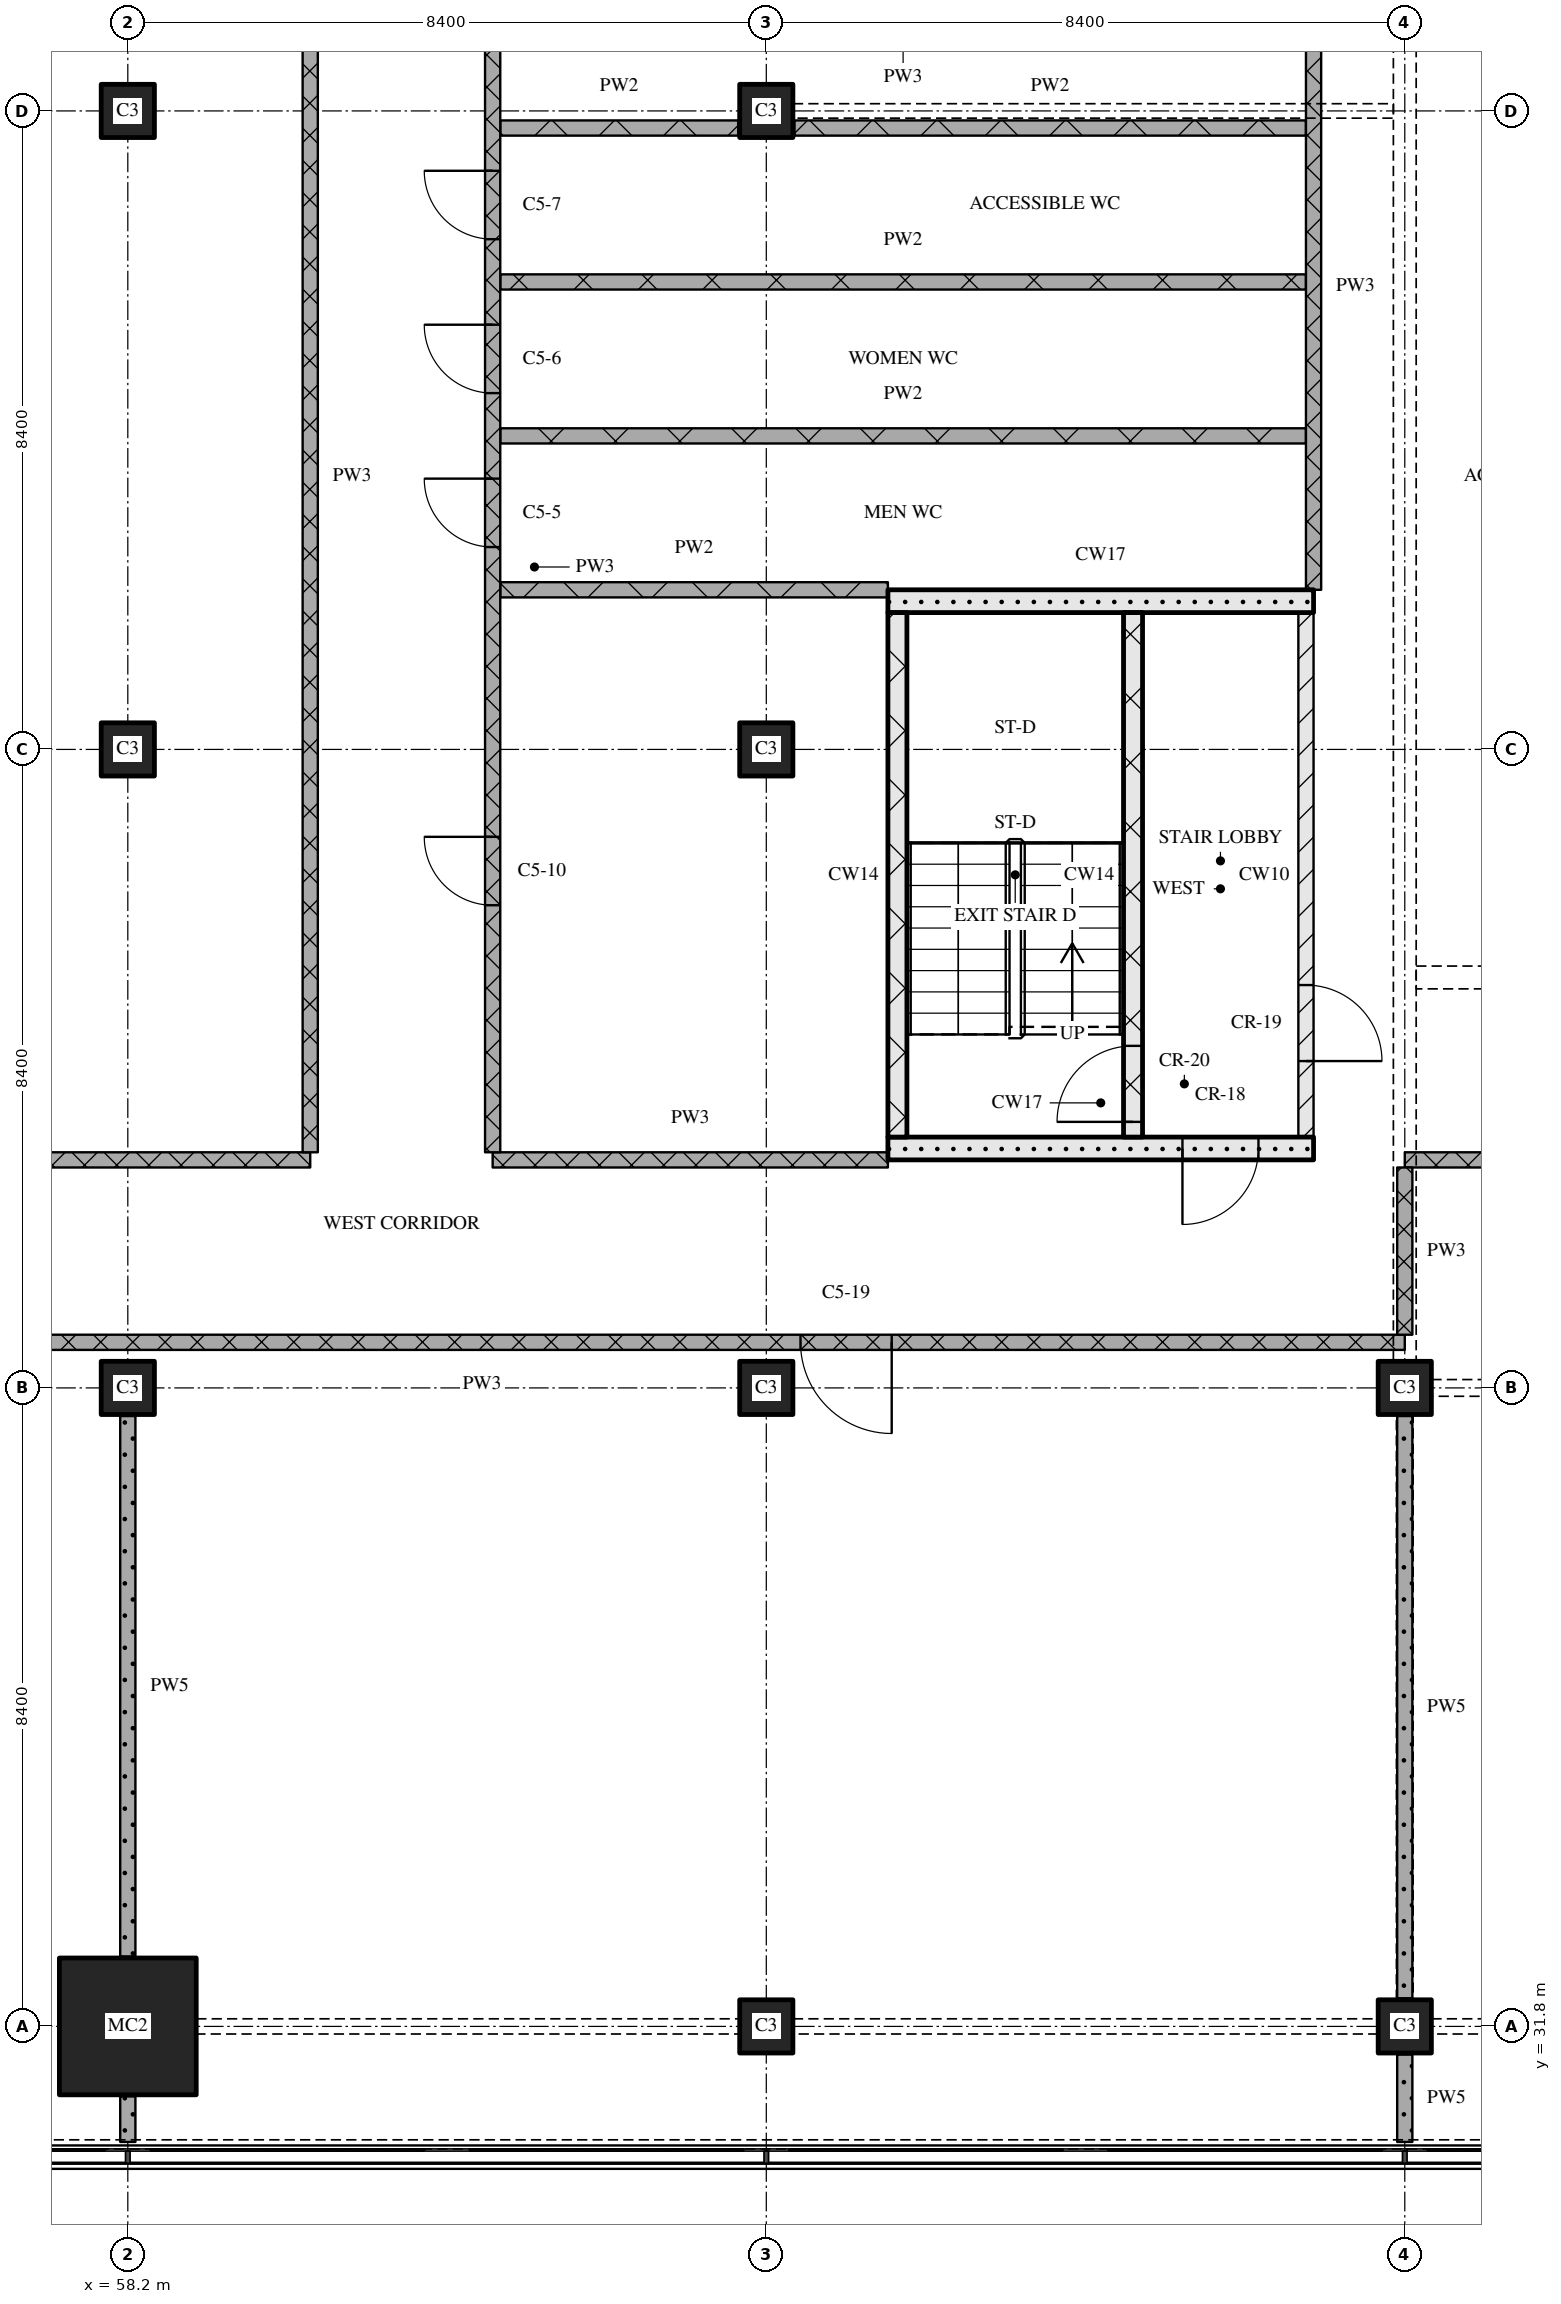
"""IFC4 building model, lengths in metres.
Left out: names, types, materials, properties, quantities, classifications, styles, units other than length and angle.
Written with IfcOpenShell. Run it as: python <this file> out.ifc"""

import sys

from ifc_helpers import new_model, si_unit, direction, frame, frame_2d, origin, origin_2d, place, context, subcontext, project, spatial, rectangle, extrude, element, fill, save


model = new_model("IFC4")
c1 = context("Model", 3, precision=1e-05, world=origin(), true_north=direction((0.0, 1.0)))
c2 = subcontext(c1, "Body", "Model", "MODEL_VIEW")
j1 = project(units=[si_unit("LENGTHUNIT", "METRE"), si_unit("PLANEANGLEUNIT", "RADIAN")], contexts=[c1])
p1 = place(None, origin())
s1 = spatial("IfcSite", under=j1, at=p1, CompositionType="ELEMENT")
p2 = place(p1, origin())
s2 = spatial("IfcBuilding", under=s1, at=p2, CompositionType="ELEMENT")
p3 = place(p2, frame((0.0, 0.0, 190.65)))
s3 = spatial("IfcBuildingStorey", under=s2, at=p3, CompositionType="ELEMENT", Elevation=190.65)
p4 = place(p3, frame((58.2, 31.8, 0.0), z_axis=(0.0, 0.0, 1.0), x_axis=(1.0, 0.0, 0.0)))
e1 = element("IfcColumn", 1, at=p4, inside=s3, PredefinedType="COLUMN", context=c2, shape_type="SweptSolid", body=[
    extrude(rectangle(XDim=1.8, YDim=1.8, at=origin_2d()), origin(), (0.0, 0.0, 1.0), 3.6),
])
for number, where, z_axis, x_axis in (
    (2, (58.2, 40.2, 0.0), (0.0, 0.0, 1.0), (1.0, 0.0, 0.0)),
    (3, (58.2, 48.6, 0.0), (0.0, 0.0, 1.0), (1.0, 0.0, 0.0)),
    (4, (58.2, 57.0, 0.0), (0.0, 0.0, 1.0), (1.0, 0.0, 0.0)),
    (5, (66.6, 31.8, 0.0), (0.0, 0.0, 1.0), (1.0, 0.0, 0.0)),
    (6, (66.6, 40.2, 0.0), (0.0, 0.0, 1.0), (1.0, 0.0, 0.0)),
    (7, (66.6, 48.6, 0.0), (0.0, 0.0, 1.0), (1.0, 0.0, 0.0)),
    (8, (66.6, 57.0, 0.0), (0.0, 0.0, 1.0), (1.0, 0.0, 0.0)),
    (9, (75.0, 31.8, 0.0), (0.0, 0.0, 1.0), (1.0, 0.0, 0.0)),
    (10, (75.0, 40.2, 0.0), (0.0, 0.0, 1.0), (1.0, 0.0, 0.0)),
):
    element("IfcColumn", number, at=place(p3, frame(where, z_axis=z_axis, x_axis=x_axis)), inside=s3, PredefinedType="COLUMN", context=c2, shape_type="SweptSolid", body=[
        extrude(rectangle(XDim=0.7, YDim=0.7, at=origin_2d()), origin(), (0.0, 0.0, 1.0), 3.6),
    ])
p5 = place(p3, frame((68.2, 43.35, 0.0), z_axis=(0.0, 0.0, 1.0), x_axis=(1.0, 0.0, 0.0)))
e11 = element("IfcWall", 11, at=p5, inside=s3, PredefinedType="SOLIDWALL", context=c2, shape_type="SweptSolid", body=[
    extrude(rectangle(XDim=5.6, YDim=0.3, at=frame_2d((2.8, 0.0))), origin(), (0.0, 0.0, 1.0), 3.3),
])
p6 = place(p5, frame((3.875, 0.0, 0.0)))
e12 = element("IfcOpeningElement", 12, at=p6, cuts=e11, PredefinedType="OPENING", context=c2, shape_type="SweptSolid", body=[
    extrude(rectangle(XDim=1.0, YDim=2.1, at=frame_2d((0.5, 1.05))), frame((0.0, 0.16, 0.0), z_axis=(0.0, -1.0, 0.0), x_axis=(1.0, 0.0, 0.0)), (0.0, 0.0, 1.0), 0.32),
])
p7 = place(p3, frame((68.325, 43.5, 0.0), z_axis=(0.0, 0.0, 1.0), x_axis=(0.0, 1.0, 0.0)))
e13 = element("IfcWall", 13, at=p7, inside=s3, PredefinedType="SOLIDWALL", context=c2, shape_type="SweptSolid", body=[
    extrude(rectangle(XDim=6.9, YDim=0.25, at=frame_2d((3.45, 0.0))), origin(), (0.0, 0.0, 1.0), 3.3),
])
p8 = place(p3, frame((71.425, 43.5, 0.0), z_axis=(0.0, 0.0, 1.0), x_axis=(0.0, 1.0, 0.0)))
e14 = element("IfcWall", 14, at=p8, inside=s3, PredefinedType="SOLIDWALL", context=c2, shape_type="SweptSolid", body=[
    extrude(rectangle(XDim=6.9, YDim=0.25, at=frame_2d((3.45, 0.0))), origin(), (0.0, 0.0, 1.0), 3.3),
])
p9 = place(p8, frame((0.2, 0.0, 0.0)))
e15 = element("IfcOpeningElement", 15, at=p9, cuts=e14, PredefinedType="OPENING", context=c2, shape_type="SweptSolid", body=[
    extrude(rectangle(XDim=1.0, YDim=2.1, at=frame_2d((0.5, 1.05))), frame((0.0, 0.135, 0.0), z_axis=(0.0, -1.0, 0.0), x_axis=(1.0, 0.0, 0.0)), (0.0, 0.0, 1.0), 0.27),
])
p10 = place(p3, frame((73.7, 43.5, 0.0), z_axis=(0.0, 0.0, 1.0), x_axis=(0.0, 1.0, 0.0)))
e16 = element("IfcWall", 16, at=p10, inside=s3, PredefinedType="PARTITIONING", context=c2, shape_type="SweptSolid", body=[
    extrude(rectangle(XDim=6.9, YDim=0.2, at=frame_2d((3.45, 0.0))), origin(), (0.0, 0.0, 1.0), 3.3),
])
p11 = place(p10, frame((1.0, 0.0, 0.0)))
e17 = element("IfcOpeningElement", 17, at=p11, cuts=e16, PredefinedType="OPENING", context=c2, shape_type="SweptSolid", body=[
    extrude(rectangle(XDim=1.0, YDim=2.1, at=frame_2d((0.5, 1.05))), frame((0.0, 0.11, 0.0), z_axis=(0.0, -1.0, 0.0), x_axis=(1.0, 0.0, 0.0)), (0.0, 0.0, 1.0), 0.22),
])
p12 = place(p3, frame((68.2, 50.55, 0.0), z_axis=(0.0, 0.0, 1.0), x_axis=(1.0, 0.0, 0.0)))
e18 = element("IfcWall", 18, at=p12, inside=s3, PredefinedType="SOLIDWALL", context=c2, shape_type="SweptSolid", body=[
    extrude(rectangle(XDim=5.6, YDim=0.3, at=frame_2d((2.8, 0.0))), origin(), (0.0, 0.0, 1.0), 3.3),
])
p13 = place(p3, frame((75.0, 40.8, 0.0), z_axis=(0.0, 0.0, 1.0), x_axis=(-1.0, 0.0, 0.0)))
e19 = element("IfcWall", 19, at=p13, inside=s3, PredefinedType="PARTITIONING", context=c2, shape_type="SweptSolid", body=[
    extrude(rectangle(XDim=24.28, YDim=0.2, at=frame_2d((12.14, 0.0))), origin(), (0.0, 0.0, 1.0), 3.3),
])
p14 = place(p13, frame((6.75, 0.0, 0.0)))
e20 = element("IfcOpeningElement", 20, at=p14, cuts=e19, PredefinedType="OPENING", context=c2, shape_type="SweptSolid", body=[
    extrude(rectangle(XDim=1.2, YDim=2.1, at=frame_2d((0.6, 1.05))), frame((0.0, 0.11, 0.0), z_axis=(0.0, -1.0, 0.0), x_axis=(1.0, 0.0, 0.0)), (0.0, 0.0, 1.0), 0.22),
])
p15 = place(p13, frame((20.728, 0.0, 0.0)))
e21 = element("IfcOpeningElement", 21, at=p15, cuts=e19, PredefinedType="OPENING", context=c2, shape_type="SweptSolid", body=[
    extrude(rectangle(XDim=1.2, YDim=2.1, at=frame_2d((0.6, 1.05))), frame((0.0, 0.11, 0.0), z_axis=(0.0, -1.0, 0.0), x_axis=(1.0, 0.0, 0.0)), (0.0, 0.0, 1.0), 0.22),
])
p16 = place(p3, frame((48.28, 43.2, 0.0), z_axis=(0.0, 0.0, 1.0), x_axis=(1.0, 0.0, 0.0)))
e22 = element("IfcWall", 22, at=p16, inside=s3, PredefinedType="PARTITIONING", context=c2, shape_type="SweptSolid", body=[
    extrude(rectangle(XDim=12.32, YDim=0.2, at=frame_2d((6.16, 0.0))), origin(), (0.0, 0.0, 1.0), 3.3),
])
p17 = place(p16, frame((5.42, 0.0, 0.0)))
e23 = element("IfcOpeningElement", 23, at=p17, cuts=e22, PredefinedType="OPENING", context=c2, shape_type="SweptSolid", body=[
    extrude(rectangle(XDim=1.2, YDim=2.1, at=frame_2d((0.6, 1.05))), frame((0.0, 0.11, 0.0), z_axis=(0.0, -1.0, 0.0), x_axis=(1.0, 0.0, 0.0)), (0.0, 0.0, 1.0), 0.22),
])
p18 = place(p3, frame((63.0, 43.2, 0.0), z_axis=(0.0, 0.0, 1.0), x_axis=(1.0, 0.0, 0.0)))
e24 = element("IfcWall", 24, at=p18, inside=s3, PredefinedType="PARTITIONING", context=c2, shape_type="SweptSolid", body=[
    extrude(rectangle(XDim=5.2, YDim=0.2, at=frame_2d((2.6, 0.0))), origin(), (0.0, 0.0, 1.0), 3.3),
])
p19 = place(p3, frame((100.2, 43.2, 0.0), z_axis=(0.0, 0.0, 1.0), x_axis=(-1.0, 0.0, 0.0)))
e25 = element("IfcWall", 25, at=p19, inside=s3, PredefinedType="PARTITIONING", context=c2, shape_type="SweptSolid", body=[
    extrude(rectangle(XDim=25.2, YDim=0.2, at=frame_2d((12.6, 0.0))), origin(), (0.0, 0.0, 1.0), 3.3),
])
p20 = place(p19, frame((3.6, 0.0, 0.0)))
e26 = element("IfcOpeningElement", 26, at=p20, cuts=e25, PredefinedType="OPENING", context=c2, shape_type="SweptSolid", body=[
    extrude(rectangle(XDim=1.2, YDim=2.1, at=frame_2d((0.6, 1.05))), frame((0.0, 0.11, 0.0), z_axis=(0.0, -1.0, 0.0), x_axis=(1.0, 0.0, 0.0)), (0.0, 0.0, 1.0), 0.22),
])
p21 = place(p19, frame((16.2, 0.0, 0.0)))
e27 = element("IfcOpeningElement", 27, at=p21, cuts=e25, PredefinedType="OPENING", context=c2, shape_type="SweptSolid", body=[
    extrude(rectangle(XDim=1.2, YDim=2.1, at=frame_2d((0.6, 1.05))), frame((0.0, 0.11, 0.0), z_axis=(0.0, -1.0, 0.0), x_axis=(1.0, 0.0, 0.0)), (0.0, 0.0, 1.0), 0.22),
])
p22 = place(p3, frame((63.1, 50.7, 0.0), z_axis=(0.0, 0.0, 1.0), x_axis=(1.0, 0.0, 0.0)))
e28 = element("IfcWall", 28, at=p22, inside=s3, PredefinedType="PARTITIONING", context=c2, shape_type="SweptSolid", body=[
    extrude(rectangle(XDim=5.1, YDim=0.2, at=frame_2d((2.55, 0.0))), origin(), (0.0, 0.0, 1.0), 3.3),
])
for number, where, z_axis, x_axis in (
    (29, (63.1, 52.725, 0.0), (0.0, 0.0, 1.0), (1.0, 0.0, 0.0)),
    (30, (63.1, 54.75, 0.0), (0.0, 0.0, 1.0), (1.0, 0.0, 0.0)),
):
    element("IfcWall", number, at=place(p3, frame(where, z_axis=z_axis, x_axis=x_axis)), inside=s3, PredefinedType="PARTITIONING", context=c2, shape_type="SweptSolid", body=[
        extrude(rectangle(XDim=10.6, YDim=0.2, at=frame_2d((5.3, 0.0))), origin(), (0.0, 0.0, 1.0), 3.3),
    ])
p23 = place(p3, frame((63.1, 56.775, 0.0), z_axis=(0.0, 0.0, 1.0), x_axis=(1.0, 0.0, 0.0)))
e31 = element("IfcWall", 31, at=p23, inside=s3, PredefinedType="PARTITIONING", context=c2, shape_type="SweptSolid", body=[
    extrude(rectangle(XDim=3.13, YDim=0.2, at=frame_2d((1.565, 0.0))), origin(), (0.0, 0.0, 1.0), 3.3),
])
p24 = place(p3, frame((66.97, 56.775, 0.0), z_axis=(0.0, 0.0, 1.0), x_axis=(1.0, 0.0, 0.0)))
e32 = element("IfcWall", 32, at=p24, inside=s3, PredefinedType="PARTITIONING", context=c2, shape_type="SweptSolid", body=[
    extrude(rectangle(XDim=6.73, YDim=0.2, at=frame_2d((3.365, 0.0))), origin(), (0.0, 0.0, 1.0), 3.3),
])
p25 = place(p3, frame((58.2, 30.88, 0.0), z_axis=(0.0, 0.0, 1.0), x_axis=(0.0, -1.0, 0.0)))
e33 = element("IfcWall", 33, at=p25, inside=s3, PredefinedType="PARTITIONING", context=c2, shape_type="SweptSolid", body=[
    extrude(rectangle(XDim=0.6, YDim=0.2, at=frame_2d((0.3, 0.0))), origin(), (0.0, 0.0, 1.0), 3.3),
])
p26 = place(p3, frame((58.2, 39.83, 0.0), z_axis=(0.0, 0.0, 1.0), x_axis=(0.0, -1.0, 0.0)))
e34 = element("IfcWall", 34, at=p26, inside=s3, PredefinedType="PARTITIONING", context=c2, shape_type="SweptSolid", body=[
    extrude(rectangle(XDim=7.11, YDim=0.2, at=frame_2d((3.555, 0.0))), origin(), (0.0, 0.0, 1.0), 3.3),
])
p27 = place(p3, frame((60.6, 61.1, 0.0), z_axis=(0.0, 0.0, 1.0), x_axis=(0.0, -1.0, 0.0)))
e35 = element("IfcWall", 35, at=p27, inside=s3, PredefinedType="PARTITIONING", context=c2, shape_type="SweptSolid", body=[
    extrude(rectangle(XDim=17.8, YDim=0.2, at=frame_2d((8.9, 0.0))), origin(), (0.0, 0.0, 1.0), 3.3),
])
p28 = place(p3, frame((63.0, 58.7, 0.0), z_axis=(0.0, 0.0, 1.0), x_axis=(0.0, -1.0, 0.0)))
e36 = element("IfcWall", 36, at=p28, inside=s3, PredefinedType="PARTITIONING", context=c2, shape_type="SweptSolid", body=[
    extrude(rectangle(XDim=15.4, YDim=0.2, at=frame_2d((7.7, 0.0))), origin(), (0.0, 0.0, 1.0), 3.3),
])
p29 = place(p28, frame((2.488, 0.0, 0.0)))
e37 = element("IfcOpeningElement", 37, at=p29, cuts=e36, PredefinedType="OPENING", context=c2, shape_type="SweptSolid", body=[
    extrude(rectangle(XDim=0.9, YDim=2.1, at=frame_2d((0.45, 1.05))), frame((0.0, 0.11, 0.0), z_axis=(0.0, -1.0, 0.0), x_axis=(1.0, 0.0, 0.0)), (0.0, 0.0, 1.0), 0.22),
])
p30 = place(p28, frame((4.512, 0.0, 0.0)))
e38 = element("IfcOpeningElement", 38, at=p30, cuts=e36, PredefinedType="OPENING", context=c2, shape_type="SweptSolid", body=[
    extrude(rectangle(XDim=0.9, YDim=2.1, at=frame_2d((0.45, 1.05))), frame((0.0, 0.11, 0.0), z_axis=(0.0, -1.0, 0.0), x_axis=(1.0, 0.0, 0.0)), (0.0, 0.0, 1.0), 0.22),
])
p31 = place(p28, frame((6.538, 0.0, 0.0)))
e39 = element("IfcOpeningElement", 39, at=p31, cuts=e36, PredefinedType="OPENING", context=c2, shape_type="SweptSolid", body=[
    extrude(rectangle(XDim=0.9, YDim=2.1, at=frame_2d((0.45, 1.05))), frame((0.0, 0.11, 0.0), z_axis=(0.0, -1.0, 0.0), x_axis=(1.0, 0.0, 0.0)), (0.0, 0.0, 1.0), 0.22),
])
p32 = place(p28, frame((11.25, 0.0, 0.0)))
e40 = element("IfcOpeningElement", 40, at=p32, cuts=e36, PredefinedType="OPENING", context=c2, shape_type="SweptSolid", body=[
    extrude(rectangle(XDim=0.9, YDim=2.1, at=frame_2d((0.45, 1.05))), frame((0.0, 0.11, 0.0), z_axis=(0.0, -1.0, 0.0), x_axis=(1.0, 0.0, 0.0)), (0.0, 0.0, 1.0), 0.22),
])
p33 = place(p3, frame((73.8, 58.7, 0.0), z_axis=(0.0, 0.0, 1.0), x_axis=(0.0, -1.0, 0.0)))
e41 = element("IfcWall", 41, at=p33, inside=s3, PredefinedType="PARTITIONING", context=c2, shape_type="SweptSolid", body=[
    extrude(rectangle(XDim=8.0, YDim=0.2, at=frame_2d((4.0, 0.0))), origin(), (0.0, 0.0, 1.0), 3.3),
])
p34 = place(p3, frame((75.0, 43.1, 0.0), z_axis=(0.0, 0.0, 1.0), x_axis=(0.0, -1.0, 0.0)))
e42 = element("IfcWall", 42, at=p34, inside=s3, PredefinedType="PARTITIONING", context=c2, shape_type="SweptSolid", body=[
    extrude(rectangle(XDim=2.2, YDim=0.2, at=frame_2d((1.1, 0.0))), origin(), (0.0, 0.0, 1.0), 2.41),
])
p35 = place(p3, frame((75.0, 31.43, 0.0), z_axis=(0.0, 0.0, 1.0), x_axis=(0.0, -1.0, 0.0)))
e43 = element("IfcWall", 43, at=p35, inside=s3, PredefinedType="PARTITIONING", context=c2, shape_type="SweptSolid", body=[
    extrude(rectangle(XDim=1.15, YDim=0.2, at=frame_2d((0.575, 0.0))), origin(), (0.0, 0.0, 1.0), 2.41),
])
p36 = place(p3, frame((75.0, 39.83, 0.0), z_axis=(0.0, 0.0, 1.0), x_axis=(0.0, -1.0, 0.0)))
e44 = element("IfcWall", 44, at=p36, inside=s3, PredefinedType="PARTITIONING", context=c2, shape_type="SweptSolid", body=[
    extrude(rectangle(XDim=7.66, YDim=0.2, at=frame_2d((3.83, 0.0))), origin(), (0.0, 0.0, 1.0), 2.7),
])
p37 = place(p6, origin())
e45 = element("IfcDoor", 45, at=p37, inside=s3, OperationType="SINGLE_SWING_RIGHT", PredefinedType="DOOR", context=c2, shape_type="SweptSolid", body=[
    extrude(rectangle(XDim=1.0, YDim=2.1, at=frame_2d((0.5, 1.05))), frame((0.0, 0.025, 0.0), z_axis=(0.0, -1.0, 0.0), x_axis=(1.0, 0.0, 0.0)), (0.0, 0.0, 1.0), 0.05),
])
fill(e12, e45)
p38 = place(p9, origin())
e46 = element("IfcDoor", 46, at=p38, inside=s3, OperationType="SINGLE_SWING_LEFT", PredefinedType="DOOR", context=c2, shape_type="SweptSolid", body=[
    extrude(rectangle(XDim=1.0, YDim=2.1, at=frame_2d((0.5, 1.05))), frame((0.0, 0.025, 0.0), z_axis=(0.0, -1.0, 0.0), x_axis=(1.0, 0.0, 0.0)), (0.0, 0.0, 1.0), 0.05),
])
fill(e15, e46)
p39 = place(p11, origin())
e47 = element("IfcDoor", 47, at=p39, inside=s3, OperationType="SINGLE_SWING_RIGHT", PredefinedType="DOOR", context=c2, shape_type="SweptSolid", body=[
    extrude(rectangle(XDim=1.0, YDim=2.1, at=frame_2d((0.5, 1.05))), frame((0.0, 0.025, 0.0), z_axis=(0.0, -1.0, 0.0), x_axis=(1.0, 0.0, 0.0)), (0.0, 0.0, 1.0), 0.05),
])
fill(e17, e47)
p40 = place(p14, origin())
e48 = element("IfcDoor", 48, at=p40, inside=s3, OperationType="SINGLE_SWING_LEFT", PredefinedType="DOOR", context=c2, shape_type="SweptSolid", body=[
    extrude(rectangle(XDim=1.2, YDim=2.1, at=frame_2d((0.6, 1.05))), frame((0.0, 0.025, 0.0), z_axis=(0.0, -1.0, 0.0), x_axis=(1.0, 0.0, 0.0)), (0.0, 0.0, 1.0), 0.05),
])
fill(e20, e48)
p41 = place(p29, origin())
e49 = element("IfcDoor", 49, at=p41, inside=s3, OperationType="SINGLE_SWING_RIGHT", PredefinedType="DOOR", context=c2, shape_type="SweptSolid", body=[
    extrude(rectangle(XDim=0.9, YDim=2.1, at=frame_2d((0.45, 1.05))), frame((0.0, 0.025, 0.0), z_axis=(0.0, -1.0, 0.0), x_axis=(1.0, 0.0, 0.0)), (0.0, 0.0, 1.0), 0.05),
])
fill(e37, e49)
p42 = place(p30, origin())
e50 = element("IfcDoor", 50, at=p42, inside=s3, OperationType="SINGLE_SWING_RIGHT", PredefinedType="DOOR", context=c2, shape_type="SweptSolid", body=[
    extrude(rectangle(XDim=0.9, YDim=2.1, at=frame_2d((0.45, 1.05))), frame((0.0, 0.025, 0.0), z_axis=(0.0, -1.0, 0.0), x_axis=(1.0, 0.0, 0.0)), (0.0, 0.0, 1.0), 0.05),
])
fill(e38, e50)
p43 = place(p31, origin())
e51 = element("IfcDoor", 51, at=p43, inside=s3, OperationType="SINGLE_SWING_RIGHT", PredefinedType="DOOR", context=c2, shape_type="SweptSolid", body=[
    extrude(rectangle(XDim=0.9, YDim=2.1, at=frame_2d((0.45, 1.05))), frame((0.0, 0.025, 0.0), z_axis=(0.0, -1.0, 0.0), x_axis=(1.0, 0.0, 0.0)), (0.0, 0.0, 1.0), 0.05),
])
fill(e39, e51)
p44 = place(p32, origin())
e52 = element("IfcDoor", 52, at=p44, inside=s3, OperationType="SINGLE_SWING_RIGHT", PredefinedType="DOOR", context=c2, shape_type="SweptSolid", body=[
    extrude(rectangle(XDim=0.9, YDim=2.1, at=frame_2d((0.45, 1.05))), frame((0.0, 0.025, 0.0), z_axis=(0.0, -1.0, 0.0), x_axis=(1.0, 0.0, 0.0)), (0.0, 0.0, 1.0), 0.05),
])
fill(e40, e52)
save(model, sys.argv[1])
